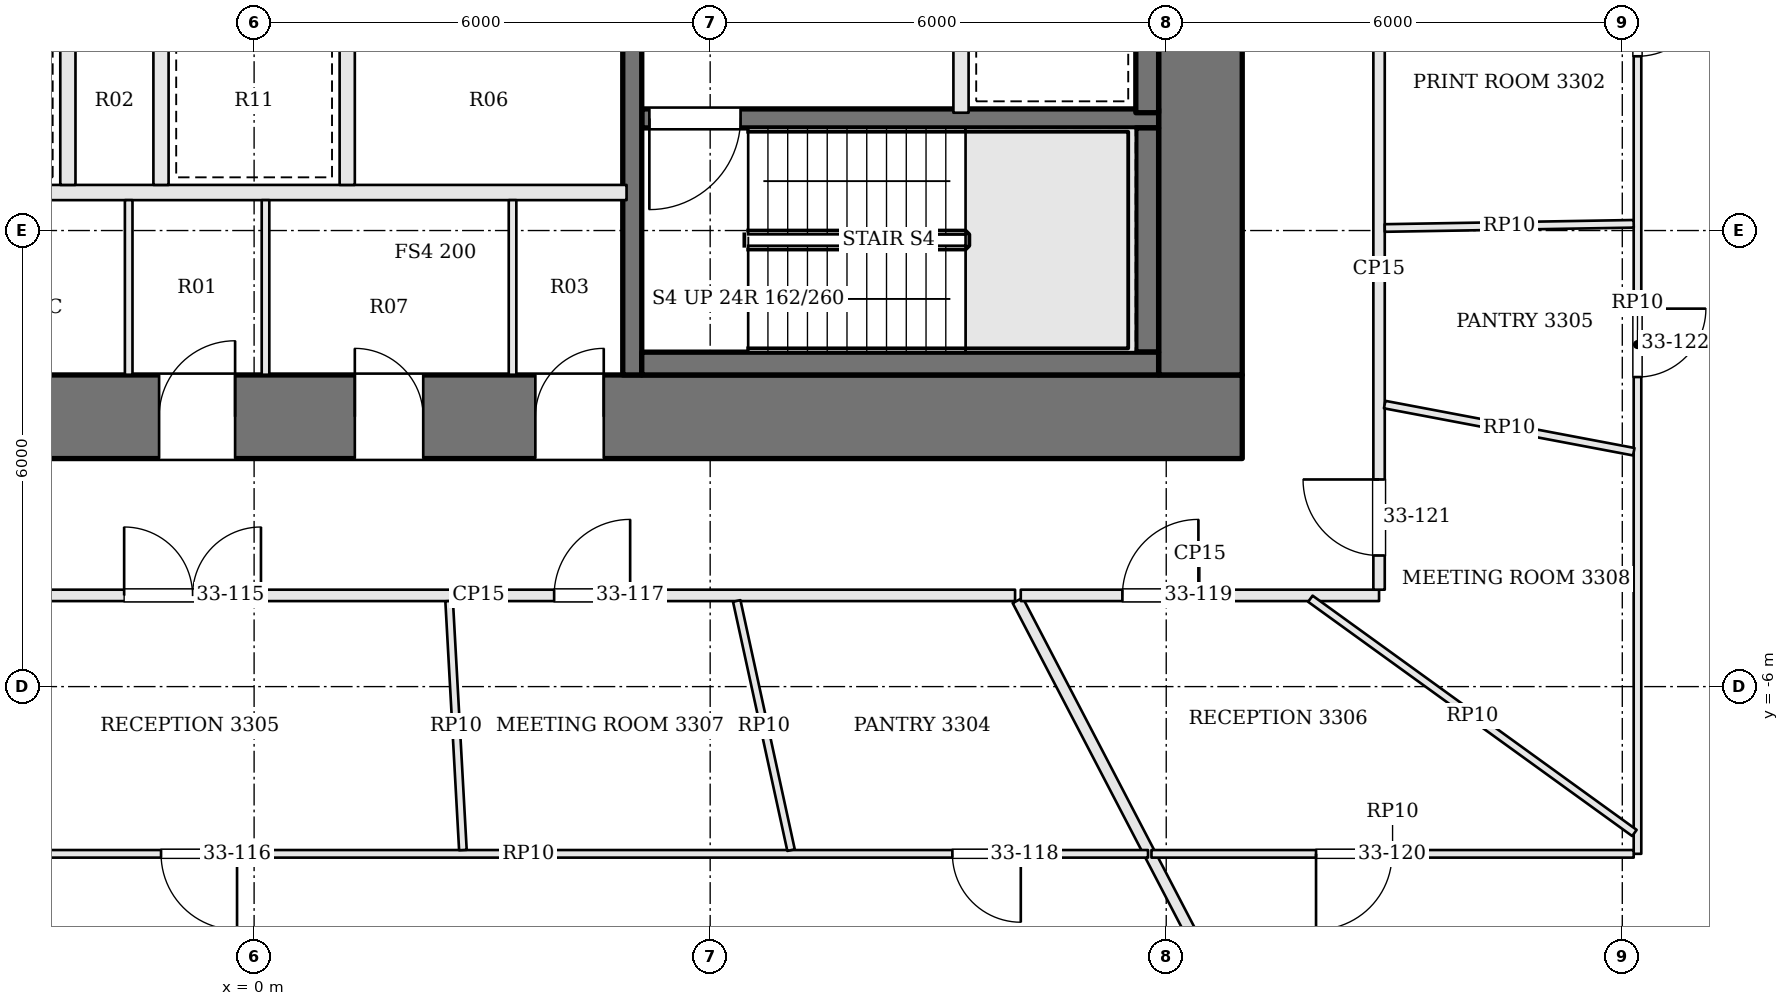
"""IFC4 building model, lengths in metres.
Left out: names, types, materials, properties, quantities, classifications, styles, units other than length and angle.
Written with IfcOpenShell. Run it as: python <this file> out.ifc"""

import sys

from ifc_helpers import new_model, si_unit, direction, frame, frame_2d, origin, place, context, subcontext, project, spatial, rectangle, extrude, element, fill, save


model = new_model("IFC4")
c1 = context("Model", 3, precision=1e-05, world=origin(), true_north=direction((0.0, 1.0)))
c2 = subcontext(c1, "Body", "Model", "MODEL_VIEW")
j1 = project(units=[si_unit("LENGTHUNIT", "METRE"), si_unit("PLANEANGLEUNIT", "RADIAN")], contexts=[c1])
p1 = place(None, origin())
s1 = spatial("IfcSite", under=j1, at=p1, CompositionType="ELEMENT")
p2 = place(p1, origin())
s2 = spatial("IfcBuilding", under=s1, at=p2, CompositionType="ELEMENT")
p3 = place(p2, frame((0.0, 0.0, 138.3)))
s3 = spatial("IfcBuildingStorey", under=s2, at=p3, CompositionType="ELEMENT", Elevation=138.3)
p4 = place(p3, frame((-13.0, -2.45, 0.0), z_axis=(0.0, 0.0, 1.0), x_axis=(1.0, 0.0, 0.0)))
e1 = element("IfcWall", 1, at=p4, inside=s3, PredefinedType="SHEAR", context=c2, shape_type="SweptSolid", body=[
    extrude(rectangle(XDim=26.0, YDim=1.1, at=frame_2d((13.0, 0.0))), origin(), (0.0, 0.0, 1.0), 3.9),
])
p5 = place(p4, frame((9.275, 0.0, 0.0)))
e2 = element("IfcOpeningElement", 2, at=p5, cuts=e1, PredefinedType="OPENING", context=c2, shape_type="SweptSolid", body=[
    extrude(rectangle(XDim=0.9, YDim=2.1, at=frame_2d((0.45, 1.05))), frame((0.0, 0.56, 0.0), z_axis=(0.0, -1.0, 0.0), x_axis=(1.0, 0.0, 0.0)), (0.0, 0.0, 1.0), 1.12),
])
p6 = place(p4, frame((11.75, 0.0, 0.0)))
e3 = element("IfcOpeningElement", 3, at=p6, cuts=e1, PredefinedType="OPENING", context=c2, shape_type="SweptSolid", body=[
    extrude(rectangle(XDim=1.0, YDim=2.1, at=frame_2d((0.5, 1.05))), frame((0.0, 0.56, 0.0), z_axis=(0.0, -1.0, 0.0), x_axis=(1.0, 0.0, 0.0)), (0.0, 0.0, 1.0), 1.12),
])
p7 = place(p4, frame((14.325, 0.0, 0.0)))
e4 = element("IfcOpeningElement", 4, at=p7, cuts=e1, PredefinedType="OPENING", context=c2, shape_type="SweptSolid", body=[
    extrude(rectangle(XDim=0.9, YDim=2.1, at=frame_2d((0.45, 1.05))), frame((0.0, 0.56, 0.0), z_axis=(0.0, -1.0, 0.0), x_axis=(1.0, 0.0, 0.0)), (0.0, 0.0, 1.0), 1.12),
])
p8 = place(p4, frame((16.7, 0.0, 0.0)))
e5 = element("IfcOpeningElement", 5, at=p8, cuts=e1, PredefinedType="OPENING", context=c2, shape_type="SweptSolid", body=[
    extrude(rectangle(XDim=0.9, YDim=2.1, at=frame_2d((0.45, 1.05))), frame((0.0, 0.56, 0.0), z_axis=(0.0, -1.0, 0.0), x_axis=(1.0, 0.0, 0.0)), (0.0, 0.0, 1.0), 1.12),
])
p9 = place(p3, frame((12.45, -1.9, 0.0), z_axis=(0.0, 0.0, 1.0), x_axis=(0.0, 1.0, 0.0)))
e6 = element("IfcWall", 6, at=p9, inside=s3, PredefinedType="SHEAR", context=c2, shape_type="SweptSolid", body=[
    extrude(rectangle(XDim=12.8, YDim=1.1, at=frame_2d((6.4, 0.0))), origin(), (0.0, 0.0, 1.0), 3.9),
])
p10 = place(p9, frame((7.1, 0.0, 0.0)))
e7 = element("IfcOpeningElement", 7, at=p10, cuts=e6, PredefinedType="OPENING", context=c2, shape_type="SweptSolid", body=[
    extrude(rectangle(XDim=1.8, YDim=2.1, at=frame_2d((0.9, 1.05))), frame((0.0, 0.56, 0.0), z_axis=(0.0, -1.0, 0.0), x_axis=(1.0, 0.0, 0.0)), (0.0, 0.0, 1.0), 1.12),
])
p11 = place(p3, frame((11.9, 1.475, 0.0), z_axis=(0.0, 0.0, 1.0), x_axis=(-1.0, 0.0, 0.0)))
e8 = element("IfcWall", 8, at=p11, inside=s3, PredefinedType="SOLIDWALL", context=c2, shape_type="SweptSolid", body=[
    extrude(rectangle(XDim=6.8, YDim=0.25, at=frame_2d((3.4, 0.0))), origin(), (0.0, 0.0, 1.0), 3.7),
])
p12 = place(p11, frame((5.5, 0.0, 0.0)))
e9 = element("IfcOpeningElement", 9, at=p12, cuts=e8, PredefinedType="OPENING", context=c2, shape_type="SweptSolid", body=[
    extrude(rectangle(XDim=1.2, YDim=2.1, at=frame_2d((0.6, 1.05))), frame((0.0, 0.135, 0.0), z_axis=(0.0, -1.0, 0.0), x_axis=(1.0, 0.0, 0.0)), (0.0, 0.0, 1.0), 0.27),
])
p13 = place(p3, frame((9.3, 4.55, 0.0), z_axis=(0.0, 0.0, 1.0), x_axis=(0.0, -1.0, 0.0)))
e10 = element("IfcWall", 10, at=p13, inside=s3, PredefinedType="SOLIDWALL", context=c2, shape_type="SweptSolid", body=[
    extrude(rectangle(XDim=3.0, YDim=0.2, at=frame_2d((1.5, 0.0))), origin(), (0.0, 0.0, 1.0), 3.7),
])
p14 = place(p3, frame((4.975, 10.9, 0.0), z_axis=(0.0, 0.0, 1.0), x_axis=(0.0, -1.0, 0.0)))
e11 = element("IfcWall", 11, at=p14, inside=s3, PredefinedType="SOLIDWALL", context=c2, shape_type="SweptSolid", body=[
    extrude(rectangle(XDim=12.8, YDim=0.25, at=frame_2d((6.4, 0.0))), origin(), (0.0, 0.0, 1.0), 3.7),
])
p15 = place(p14, frame((4.95, 0.0, 0.0)))
e12 = element("IfcOpeningElement", 12, at=p15, cuts=e11, PredefinedType="OPENING", context=c2, shape_type="SweptSolid", body=[
    extrude(rectangle(XDim=1.2, YDim=2.1, at=frame_2d((0.6, 1.05))), frame((0.0, 0.135, 0.0), z_axis=(0.0, -1.0, 0.0), x_axis=(1.0, 0.0, 0.0)), (0.0, 0.0, 1.0), 0.27),
])
p16 = place(p3, frame((11.75, 4.55, 0.0), z_axis=(0.0, 0.0, 1.0), x_axis=(0.0, -1.0, 0.0)))
e13 = element("IfcWall", 13, at=p16, inside=s3, PredefinedType="SOLIDWALL", context=c2, shape_type="SweptSolid", body=[
    extrude(rectangle(XDim=3.0, YDim=0.3, at=frame_2d((1.5, 0.0))), origin(), (0.0, 0.0, 1.0), 3.7),
])
p17 = place(p3, frame((11.75, 1.35, 0.0), z_axis=(0.0, 0.0, 1.0), x_axis=(0.0, -1.0, 0.0)))
e14 = element("IfcWall", 14, at=p17, inside=s3, PredefinedType="SOLIDWALL", context=c2, shape_type="SweptSolid", body=[
    extrude(rectangle(XDim=2.95, YDim=0.3, at=frame_2d((1.475, 0.0))), origin(), (0.0, 0.0, 1.0), 3.7),
])
p18 = place(p3, frame((11.9, -1.75, 0.0), z_axis=(0.0, 0.0, 1.0), x_axis=(-1.0, 0.0, 0.0)))
e15 = element("IfcWall", 15, at=p18, inside=s3, PredefinedType="SOLIDWALL", context=c2, shape_type="SweptSolid", body=[
    extrude(rectangle(XDim=6.8, YDim=0.3, at=frame_2d((3.4, 0.0))), origin(), (0.0, 0.0, 1.0), 3.7),
])
p19 = place(p3, frame((-4.9, 0.5, 0.0), z_axis=(0.0, 0.0, 1.0), x_axis=(1.0, 0.0, 0.0)))
e16 = element("IfcWall", 16, at=p19, inside=s3, PredefinedType="SOLIDWALL", context=c2, shape_type="SweptSolid", body=[
    extrude(rectangle(XDim=9.8, YDim=0.2, at=frame_2d((4.9, 0.0))), origin(), (0.0, 0.0, 1.0), 3.7),
])
for number, where, z_axis, x_axis in (
    (17, (-2.45, 0.6, 0.0), (0.0, 0.0, 1.0), (0.0, 1.0, 0.0)),
    (18, (-1.225, 0.6, 0.0), (0.0, 0.0, 1.0), (0.0, 1.0, 0.0)),
    (19, (1.225, 0.6, 0.0), (0.0, 0.0, 1.0), (0.0, 1.0, 0.0)),
):
    element("IfcWall", number, at=place(p3, frame(where, z_axis=z_axis, x_axis=x_axis)), inside=s3, PredefinedType="SOLIDWALL", context=c2, shape_type="SweptSolid", body=[
        extrude(rectangle(XDim=2.2, YDim=0.2, at=frame_2d((1.1, 0.0))), origin(), (0.0, 0.0, 1.0), 3.7),
    ])
for number, where, z_axis, x_axis in (
    (20, (-1.65, -1.9, 0.0), (0.0, 0.0, 1.0), (0.0, 1.0, 0.0)),
    (21, (0.15, -1.9, 0.0), (0.0, 0.0, 1.0), (0.0, 1.0, 0.0)),
    (22, (3.4, -1.9, 0.0), (0.0, 0.0, 1.0), (0.0, 1.0, 0.0)),
):
    element("IfcWall", number, at=place(p3, frame(where, z_axis=z_axis, x_axis=x_axis)), inside=s3, PredefinedType="PARTITIONING", context=c2, shape_type="SweptSolid", body=[
        extrude(rectangle(XDim=2.3, YDim=0.1, at=frame_2d((1.15, 0.0))), origin(), (0.0, 0.0, 1.0), 3.7),
    ])
p20 = place(p3, frame((-4.106, -4.8, 0.0), z_axis=(0.0, 0.0, 1.0), x_axis=(1.0, 0.0, 0.0)))
e23 = element("IfcWall", 23, at=p20, inside=s3, PredefinedType="PARTITIONING", context=c2, shape_type="SweptSolid", body=[
    extrude(rectangle(XDim=14.117, YDim=0.15, at=frame_2d((7.059, 0.0))), origin(), (0.0, 0.0, 1.0), 3.198),
])
p21 = place(p20, frame((2.396, 0.0, 0.0)))
e24 = element("IfcOpeningElement", 24, at=p21, cuts=e23, PredefinedType="OPENING", context=c2, shape_type="SweptSolid", body=[
    extrude(rectangle(XDim=1.8, YDim=2.1, at=frame_2d((0.9, 1.05))), frame((0.0, 0.085, 0.0), z_axis=(0.0, -1.0, 0.0), x_axis=(1.0, 0.0, 0.0)), (0.0, 0.0, 1.0), 0.17),
])
p22 = place(p20, frame((8.053, 0.0, 0.0)))
e25 = element("IfcOpeningElement", 25, at=p22, cuts=e23, PredefinedType="OPENING", context=c2, shape_type="SweptSolid", body=[
    extrude(rectangle(XDim=1.0, YDim=2.4, at=frame_2d((0.5, 1.2))), frame((0.0, 0.085, 0.0), z_axis=(0.0, -1.0, 0.0), x_axis=(1.0, 0.0, 0.0)), (0.0, 0.0, 1.0), 0.17),
])
p23 = place(p3, frame((15.244, -14.841, 0.0), z_axis=(0.0, 0.0, 1.0), x_axis=(-0.46213645011, 0.88680883029, 0.0)))
e26 = element("IfcWall", 26, at=p23, inside=s3, PredefinedType="PARTITIONING", context=c2, shape_type="SweptSolid", body=[
    extrude(rectangle(XDim=11.248, YDim=0.15, at=frame_2d((5.624, 0.0))), origin(), (0.0, 0.0, 1.0), 3.198),
])
p24 = place(p3, frame((10.086, -4.8, 0.0), z_axis=(0.0, 0.0, 1.0), x_axis=(1.0, 0.0, 0.0)))
e27 = element("IfcWall", 27, at=p24, inside=s3, PredefinedType="PARTITIONING", context=c2, shape_type="SweptSolid", body=[
    extrude(rectangle(XDim=4.714, YDim=0.15, at=frame_2d((2.357, 0.0))), origin(), (0.0, 0.0, 1.0), 3.198),
])
p25 = place(p24, frame((1.337, 0.0, 0.0)))
e28 = element("IfcOpeningElement", 28, at=p25, cuts=e27, PredefinedType="OPENING", context=c2, shape_type="SweptSolid", body=[
    extrude(rectangle(XDim=1.0, YDim=2.1, at=frame_2d((0.5, 1.05))), frame((0.0, 0.085, 0.0), z_axis=(0.0, -1.0, 0.0), x_axis=(1.0, 0.0, 0.0)), (0.0, 0.0, 1.0), 0.17),
])
p26 = place(p3, frame((14.8, -4.725, 0.0), z_axis=(0.0, 0.0, 1.0), x_axis=(0.0, 1.0, 0.0)))
e29 = element("IfcWall", 29, at=p26, inside=s3, PredefinedType="PARTITIONING", context=c2, shape_type="SweptSolid", body=[
    extrude(rectangle(XDim=8.434, YDim=0.15, at=frame_2d((4.217, 0.0))), origin(), (0.0, 0.0, 1.0), 3.198),
])
p27 = place(p26, frame((0.45, 0.0, 0.0)))
e30 = element("IfcOpeningElement", 30, at=p27, cuts=e29, PredefinedType="OPENING", context=c2, shape_type="SweptSolid", body=[
    extrude(rectangle(XDim=1.0, YDim=2.4, at=frame_2d((0.5, 1.2))), frame((0.0, 0.085, 0.0), z_axis=(0.0, -1.0, 0.0), x_axis=(1.0, 0.0, 0.0)), (0.0, 0.0, 1.0), 0.17),
])
p28 = place(p3, frame((11.76, -8.2, 0.0), z_axis=(0.0, 0.0, 1.0), x_axis=(-1.0, 0.0, 0.0)))
e31 = element("IfcWall", 31, at=p28, inside=s3, PredefinedType="PARTITIONING", context=c2, shape_type="SweptSolid", body=[
    extrude(rectangle(XDim=16.305, YDim=0.1, at=frame_2d((8.152, 0.0))), origin(), (0.0, 0.0, 1.0), 3.184),
])
p29 = place(p28, frame((11.985, 0.0, 0.0)))
e32 = element("IfcOpeningElement", 32, at=p29, cuts=e31, PredefinedType="OPENING", context=c2, shape_type="SweptSolid", body=[
    extrude(rectangle(XDim=1.0, YDim=2.1, at=frame_2d((0.5, 1.05))), frame((0.0, 0.06, 0.0), z_axis=(0.0, -1.0, 0.0), x_axis=(1.0, 0.0, 0.0)), (0.0, 0.0, 1.0), 0.12),
])
p30 = place(p28, frame((1.674, 0.0, 0.0)))
e33 = element("IfcOpeningElement", 33, at=p30, cuts=e31, PredefinedType="OPENING", context=c2, shape_type="SweptSolid", body=[
    extrude(rectangle(XDim=0.9, YDim=2.1, at=frame_2d((0.45, 1.05))), frame((0.0, 0.06, 0.0), z_axis=(0.0, -1.0, 0.0), x_axis=(1.0, 0.0, 0.0)), (0.0, 0.0, 1.0), 0.12),
])
p31 = place(p3, frame((2.566, -4.875, 0.0), z_axis=(0.0, 0.0, 1.0), x_axis=(0.05515260166, -0.998477936927, 0.0)))
e34 = element("IfcWall", 34, at=p31, inside=s3, PredefinedType="PARTITIONING", context=c2, shape_type="SweptSolid", body=[
    extrude(rectangle(XDim=3.28, YDim=0.1, at=frame_2d((1.64, 0.0))), origin(), (0.0, 0.0, 1.0), 3.184),
])
p32 = place(p3, frame((6.35, -4.873, 0.0), z_axis=(0.0, 0.0, 1.0), x_axis=(0.213006668545, -0.977050745435, 0.0)))
e35 = element("IfcWall", 35, at=p32, inside=s3, PredefinedType="PARTITIONING", context=c2, shape_type="SweptSolid", body=[
    extrude(rectangle(XDim=3.355, YDim=0.1, at=frame_2d((1.677, 0.0))), origin(), (0.0, 0.0, 1.0), 3.184),
])
p33 = place(p3, frame((18.2, 5.199, 0.0), z_axis=(0.0, 0.0, 1.0), x_axis=(0.0, -1.0, 0.0)))
e36 = element("IfcWall", 36, at=p33, inside=s3, PredefinedType="PARTITIONING", context=c2, shape_type="SweptSolid", body=[
    extrude(rectangle(XDim=13.399, YDim=0.1, at=frame_2d((6.7, 0.0))), origin(), (0.0, 0.0, 1.0), 3.184),
])
p34 = place(p33, frame((6.227, 0.0, 0.0)))
e37 = element("IfcOpeningElement", 37, at=p34, cuts=e36, PredefinedType="OPENING", context=c2, shape_type="SweptSolid", body=[
    extrude(rectangle(XDim=0.9, YDim=2.1, at=frame_2d((0.45, 1.05))), frame((0.0, 0.06, 0.0), z_axis=(0.0, -1.0, 0.0), x_axis=(1.0, 0.0, 0.0)), (0.0, 0.0, 1.0), 0.12),
])
p35 = place(p33, frame((2.007, 0.0, 0.0)))
e38 = element("IfcOpeningElement", 38, at=p35, cuts=e36, PredefinedType="OPENING", context=c2, shape_type="SweptSolid", body=[
    extrude(rectangle(XDim=0.9, YDim=2.1, at=frame_2d((0.45, 1.05))), frame((0.0, 0.06, 0.0), z_axis=(0.0, -1.0, 0.0), x_axis=(1.0, 0.0, 0.0)), (0.0, 0.0, 1.0), 0.12),
])
p36 = place(p3, frame((18.15, -8.2, 0.0), z_axis=(0.0, 0.0, 1.0), x_axis=(-1.0, 0.0, 0.0)))
e39 = element("IfcWall", 39, at=p36, inside=s3, PredefinedType="PARTITIONING", context=c2, shape_type="SweptSolid", body=[
    extrude(rectangle(XDim=6.344, YDim=0.1, at=frame_2d((3.172, 0.0))), origin(), (0.0, 0.0, 1.0), 3.184),
])
p37 = place(p36, frame((3.179, 0.0, 0.0)))
e40 = element("IfcOpeningElement", 40, at=p37, cuts=e39, PredefinedType="OPENING", context=c2, shape_type="SweptSolid", body=[
    extrude(rectangle(XDim=1.0, YDim=2.1, at=frame_2d((0.5, 1.05))), frame((0.0, 0.06, 0.0), z_axis=(0.0, -1.0, 0.0), x_axis=(1.0, 0.0, 0.0)), (0.0, 0.0, 1.0), 0.12),
])
p38 = place(p3, frame((13.896, -4.844, 0.0), z_axis=(0.0, 0.0, 1.0), x_axis=(0.810468668719, -0.585781987624, 0.0)))
e41 = element("IfcWall", 41, at=p38, inside=s3, PredefinedType="PARTITIONING", context=c2, shape_type="SweptSolid", body=[
    extrude(rectangle(XDim=5.26, YDim=0.1, at=frame_2d((2.63, 0.0))), origin(), (0.0, 0.0, 1.0), 3.184),
])
p39 = place(p3, frame((14.874, -2.29, 0.0), z_axis=(0.0, 0.0, 1.0), x_axis=(0.982563379302, -0.185927958238, 0.0)))
e42 = element("IfcWall", 42, at=p39, inside=s3, PredefinedType="PARTITIONING", context=c2, shape_type="SweptSolid", body=[
    extrude(rectangle(XDim=3.335, YDim=0.1, at=frame_2d((1.667, 0.0))), origin(), (0.0, 0.0, 1.0), 3.184),
])
p40 = place(p3, frame((14.875, 0.033, 0.0), z_axis=(0.0, 0.0, 1.0), x_axis=(0.999856843244, 0.016920195573, 0.0)))
e43 = element("IfcWall", 43, at=p40, inside=s3, PredefinedType="PARTITIONING", context=c2, shape_type="SweptSolid", body=[
    extrude(rectangle(XDim=3.275, YDim=0.1, at=frame_2d((1.638, 0.0))), origin(), (0.0, 0.0, 1.0), 3.184),
])
p41 = place(p12, origin())
e44 = element("IfcDoor", 44, at=p41, inside=s3, OperationType="SINGLE_SWING_RIGHT", PredefinedType="DOOR", context=c2, shape_type="SweptSolid", body=[
    extrude(rectangle(XDim=1.2, YDim=2.1, at=frame_2d((0.6, 1.05))), frame((0.0, 0.025, 0.0), z_axis=(0.0, -1.0, 0.0), x_axis=(1.0, 0.0, 0.0)), (0.0, 0.0, 1.0), 0.05),
])
fill(e9, e44)
p42 = place(p6, origin())
e45 = element("IfcDoor", 45, at=p42, inside=s3, OperationType="SINGLE_SWING_RIGHT", PredefinedType="DOOR", context=c2, shape_type="SweptSolid", body=[
    extrude(rectangle(XDim=1.0, YDim=2.1, at=frame_2d((0.5, 1.05))), frame((0.0, 0.025, 0.0), z_axis=(0.0, -1.0, 0.0), x_axis=(1.0, 0.0, 0.0)), (0.0, 0.0, 1.0), 0.05),
])
fill(e3, e45)
p43 = place(p7, origin())
e46 = element("IfcDoor", 46, at=p43, inside=s3, OperationType="SINGLE_SWING_LEFT", PredefinedType="DOOR", context=c2, shape_type="SweptSolid", body=[
    extrude(rectangle(XDim=0.9, YDim=2.1, at=frame_2d((0.45, 1.05))), frame((0.0, 0.025, 0.0), z_axis=(0.0, -1.0, 0.0), x_axis=(1.0, 0.0, 0.0)), (0.0, 0.0, 1.0), 0.05),
])
fill(e4, e46)
p44 = place(p8, origin())
e47 = element("IfcDoor", 47, at=p44, inside=s3, OperationType="SINGLE_SWING_RIGHT", PredefinedType="DOOR", context=c2, shape_type="SweptSolid", body=[
    extrude(rectangle(XDim=0.9, YDim=2.1, at=frame_2d((0.45, 1.05))), frame((0.0, 0.025, 0.0), z_axis=(0.0, -1.0, 0.0), x_axis=(1.0, 0.0, 0.0)), (0.0, 0.0, 1.0), 0.05),
])
fill(e5, e47)
p45 = place(p21, origin())
e48 = element("IfcDoor", 48, at=p45, inside=s3, OperationType="DOUBLE_DOOR_SINGLE_SWING", PredefinedType="DOOR", context=c2, shape_type="SweptSolid", body=[
    extrude(rectangle(XDim=1.8, YDim=2.1, at=frame_2d((0.9, 1.05))), frame((0.0, 0.025, 0.0), z_axis=(0.0, -1.0, 0.0), x_axis=(1.0, 0.0, 0.0)), (0.0, 0.0, 1.0), 0.05),
])
fill(e24, e48)
p46 = place(p29, origin())
e49 = element("IfcDoor", 49, at=p46, inside=s3, OperationType="SINGLE_SWING_LEFT", PredefinedType="DOOR", context=c2, shape_type="SweptSolid", body=[
    extrude(rectangle(XDim=1.0, YDim=2.1, at=frame_2d((0.5, 1.05))), frame((0.0, 0.025, 0.0), z_axis=(0.0, -1.0, 0.0), x_axis=(1.0, 0.0, 0.0)), (0.0, 0.0, 1.0), 0.05),
])
fill(e32, e49)
p47 = place(p22, origin())
e50 = element("IfcDoor", 50, at=p47, inside=s3, OperationType="SINGLE_SWING_RIGHT", PredefinedType="DOOR", context=c2, shape_type="SweptSolid", body=[
    extrude(rectangle(XDim=1.0, YDim=2.4, at=frame_2d((0.5, 1.2))), frame((0.0, 0.025, 0.0), z_axis=(0.0, -1.0, 0.0), x_axis=(1.0, 0.0, 0.0)), (0.0, 0.0, 1.0), 0.05),
])
fill(e25, e50)
p48 = place(p30, origin())
e51 = element("IfcDoor", 51, at=p48, inside=s3, OperationType="SINGLE_SWING_LEFT", PredefinedType="DOOR", context=c2, shape_type="SweptSolid", body=[
    extrude(rectangle(XDim=0.9, YDim=2.1, at=frame_2d((0.45, 1.05))), frame((0.0, 0.025, 0.0), z_axis=(0.0, -1.0, 0.0), x_axis=(1.0, 0.0, 0.0)), (0.0, 0.0, 1.0), 0.05),
])
fill(e33, e51)
p49 = place(p25, origin())
e52 = element("IfcDoor", 52, at=p49, inside=s3, OperationType="SINGLE_SWING_RIGHT", PredefinedType="DOOR", context=c2, shape_type="SweptSolid", body=[
    extrude(rectangle(XDim=1.0, YDim=2.1, at=frame_2d((0.5, 1.05))), frame((0.0, 0.025, 0.0), z_axis=(0.0, -1.0, 0.0), x_axis=(1.0, 0.0, 0.0)), (0.0, 0.0, 1.0), 0.05),
])
fill(e28, e52)
p50 = place(p37, origin())
e53 = element("IfcDoor", 53, at=p50, inside=s3, OperationType="SINGLE_SWING_RIGHT", PredefinedType="DOOR", context=c2, shape_type="SweptSolid", body=[
    extrude(rectangle(XDim=1.0, YDim=2.1, at=frame_2d((0.5, 1.05))), frame((0.0, 0.025, 0.0), z_axis=(0.0, -1.0, 0.0), x_axis=(1.0, 0.0, 0.0)), (0.0, 0.0, 1.0), 0.05),
])
fill(e40, e53)
p51 = place(p27, origin())
e54 = element("IfcDoor", 54, at=p51, inside=s3, OperationType="SINGLE_SWING_RIGHT", PredefinedType="DOOR", context=c2, shape_type="SweptSolid", body=[
    extrude(rectangle(XDim=1.0, YDim=2.4, at=frame_2d((0.5, 1.2))), frame((0.0, 0.025, 0.0), z_axis=(0.0, -1.0, 0.0), x_axis=(1.0, 0.0, 0.0)), (0.0, 0.0, 1.0), 0.05),
])
fill(e30, e54)
p52 = place(p34, origin())
e55 = element("IfcDoor", 55, at=p52, inside=s3, OperationType="SINGLE_SWING_LEFT", PredefinedType="DOOR", context=c2, shape_type="SweptSolid", body=[
    extrude(rectangle(XDim=0.9, YDim=2.1, at=frame_2d((0.45, 1.05))), frame((0.0, 0.025, 0.0), z_axis=(0.0, -1.0, 0.0), x_axis=(1.0, 0.0, 0.0)), (0.0, 0.0, 1.0), 0.05),
])
fill(e37, e55)
p53 = place(p35, origin())
e56 = element("IfcDoor", 56, at=p53, inside=s3, OperationType="SINGLE_SWING_LEFT", PredefinedType="DOOR", context=c2, shape_type="SweptSolid", body=[
    extrude(rectangle(XDim=0.9, YDim=2.1, at=frame_2d((0.45, 1.05))), frame((0.0, 0.025, 0.0), z_axis=(0.0, -1.0, 0.0), x_axis=(1.0, 0.0, 0.0)), (0.0, 0.0, 1.0), 0.05),
])
fill(e38, e56)
save(model, sys.argv[1])
